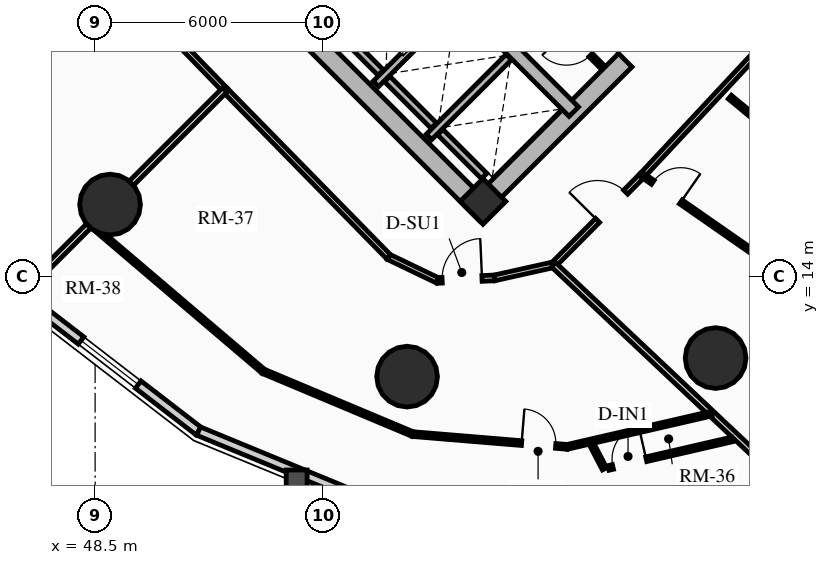
"""IFC4 building model, lengths in metres.
Left out: names, types, materials, properties, quantities, classifications, styles, units other than length and angle.
Written with IfcOpenShell. Run it as: python <this file> out.ifc"""

import sys

from ifc_helpers import new_model, si_unit, direction, frame, frame_2d, origin, origin_2d, place, context, subcontext, project, spatial, rectangle, circle, extrude, source, transform, mapped, element, fill, save


model = new_model("IFC4")
c1 = context("Model", 3, precision=1e-05, world=origin(), true_north=direction((0.0, 1.0)))
c2 = subcontext(c1, "Body", "Model", "MODEL_VIEW")
j1 = project(units=[si_unit("LENGTHUNIT", "METRE"), si_unit("PLANEANGLEUNIT", "RADIAN")], contexts=[c1])
p1 = place(None, origin())
s1 = spatial("IfcSite", under=j1, at=p1, CompositionType="ELEMENT")
p2 = place(p1, origin())
s2 = spatial("IfcBuilding", under=s1, at=p2, CompositionType="ELEMENT")
p3 = place(p2, frame((0.0, 0.0, 42.37)))
s3 = spatial("IfcBuildingStorey", under=s2, at=p3, CompositionType="ELEMENT", Elevation=42.37)
p4 = place(p3, frame((58.773, 15.661, 0.0), z_axis=(0.0, 0.0, 1.0), x_axis=(-0.707106781187, 0.707106781187, 0.0)))
e1 = element("IfcWall", 1, at=p4, inside=s3, PredefinedType="SHEAR", context=c2, shape_type="SweptSolid", body=[
    extrude(rectangle(XDim=14.3, YDim=0.5, at=frame_2d((7.15, 0.0))), origin(), (0.0, 0.0, 1.0), 2.91),
])
p5 = place(p3, frame((58.596, 15.838, 0.0), z_axis=(0.0, 0.0, 1.0), x_axis=(0.707106781187, 0.707106781187, 0.0)))
e2 = element("IfcWall", 2, at=p5, inside=s3, PredefinedType="SHEAR", context=c2, shape_type="SweptSolid", body=[
    extrude(rectangle(XDim=10.7, YDim=0.5, at=frame_2d((5.35, 0.0))), origin(), (0.0, 0.0, 1.0), 2.91),
])
m1 = source(origin(), c2, "Body", "SweptSolid", [
    extrude(rectangle(XDim=1.5, YDim=2.02, at=frame_2d((0.75, 1.01))), frame((0.0, 0.26, 0.0), z_axis=(0.0, -1.0, 0.0), x_axis=(1.0, 0.0, 0.0)), (0.0, 0.0, 1.0), 0.52),
])
p6 = place(p5, frame((5.45, 0.0, 0.0)))
e3 = element("IfcOpeningElement", 3, at=p6, cuts=e2, PredefinedType="OPENING", context=c2, shape_type="MappedRepresentation", body=[
    mapped(m1, transform((0.0, 0.0, 0.0), x_axis=(1.0, 0.0, 0.0), y_axis=(0.0, 1.0, 0.0), z_axis=(0.0, 0.0, 1.0), scale=1.0)),
])
p7 = place(p3, frame((61.096, 18.338, 0.0), z_axis=(0.0, 0.0, 1.0), x_axis=(-0.707106781187, 0.707106781187, 0.0)))
e4 = element("IfcWall", 4, at=p7, inside=s3, PredefinedType="SHEAR", context=c2, shape_type="SweptSolid", body=[
    extrude(rectangle(XDim=13.8, YDim=0.35, at=frame_2d((6.9, 0.0))), origin(), (0.0, 0.0, 1.0), 2.91),
])
m2 = source(origin(), c2, "Body", "SweptSolid", [
    extrude(rectangle(XDim=1.1, YDim=2.015, at=frame_2d((0.55, 1.007))), frame((0.0, 0.185, 0.0), z_axis=(0.0, -1.0, 0.0), x_axis=(1.0, 0.0, 0.0)), (0.0, 0.0, 1.0), 0.37),
])
p8 = place(p7, frame((4.9, 0.0, 0.0)))
e5 = element("IfcOpeningElement", 5, at=p8, cuts=e4, PredefinedType="OPENING", context=c2, shape_type="MappedRepresentation", body=[
    mapped(m2, transform((0.0, 0.0, 0.0), x_axis=(1.0, 0.0, 0.0), y_axis=(0.0, 1.0, 0.0), z_axis=(0.0, 0.0, 1.0), scale=1.0)),
])
m3 = source(origin(), c2, "Body", "SweptSolid", [
    extrude(rectangle(XDim=1.15, YDim=2.02, at=frame_2d((0.575, 1.01))), frame((0.0, 0.185, 0.0), z_axis=(0.0, -1.0, 0.0), x_axis=(1.0, 0.0, 0.0)), (0.0, 0.0, 1.0), 0.37),
])
p9 = place(p7, frame((7.32, 0.0, 0.0)))
e6 = element("IfcOpeningElement", 6, at=p9, cuts=e4, PredefinedType="OPENING", context=c2, shape_type="MappedRepresentation", body=[
    mapped(m3, transform((0.0, 0.0, 0.0), x_axis=(1.0, 0.0, 0.0), y_axis=(0.0, 1.0, 0.0), z_axis=(0.0, 0.0, 1.0), scale=1.0)),
])
p10 = place(p3, frame((58.706, 15.976, 0.0), z_axis=(0.0, 0.0, 1.0), x_axis=(0.707106781187, 0.707106781187, 0.0)))
e7 = element("IfcColumn", 7, at=p10, inside=s3, PredefinedType="COLUMN", context=c2, shape_type="SweptSolid", body=[
    extrude(rectangle(XDim=0.85, YDim=0.85, at=origin_2d()), origin(), (0.0, 0.0, 1.0), 2.91),
])
for number, where, z_axis, x_axis in (
    (8, (48.893, 15.893, 0.0), (0.0, 0.0, 1.0), (1.0, 0.0, 0.0)),
    (9, (56.709, 11.365, 0.0), (0.0, 0.0, 1.0), (1.0, 0.0, 0.0)),
    (10, (64.827, 11.854, 0.0), (0.0, 0.0, 1.0), (1.0, 0.0, 0.0)),
):
    element("IfcColumn", number, at=place(p3, frame(where, z_axis=z_axis, x_axis=x_axis)), inside=s3, PredefinedType="USERDEFINED", context=c2, shape_type="SweptSolid", body=[
        extrude(circle(Radius=0.8, at=origin_2d()), origin(), (0.0, 0.0, 1.0), 2.91),
    ])
p11 = place(p3, frame((51.222, 9.932, 0.0), z_axis=(0.0, 0.0, 1.0), x_axis=(-0.792020182601, 0.610494906082, 0.0)))
e11 = element("IfcWall", 11, at=p11, inside=s3, PredefinedType="SOLIDWALL", context=c2, shape_type="SweptSolid", body=[
    extrude(rectangle(XDim=5.911, YDim=0.24, at=frame_2d((2.956, 0.0))), origin(), (0.0, 0.0, 1.0), 2.073),
])
m4 = source(origin(), c2, "Body", "SweptSolid", [
    extrude(rectangle(XDim=1.9, YDim=1.35, at=frame_2d((0.95, 0.675))), frame((0.0, 0.13, 0.0), z_axis=(0.0, -1.0, 0.0), x_axis=(1.0, 0.0, 0.0)), (0.0, 0.0, 1.0), 0.26),
])
p12 = place(p11, frame((2.005, 0.0, 0.65)))
e12 = element("IfcOpeningElement", 12, at=p12, cuts=e11, PredefinedType="OPENING", context=c2, shape_type="MappedRepresentation", body=[
    mapped(m4, transform((0.0, 0.0, 0.0), x_axis=(1.0, 0.0, 0.0), y_axis=(0.0, 1.0, 0.0), z_axis=(0.0, 0.0, 1.0), scale=1.0)),
])
p13 = place(p3, frame((56.518, 7.749, 0.0), z_axis=(0.0, 0.0, 1.0), x_axis=(-0.924542988536, 0.381077764176, 0.0)))
e13 = element("IfcWall", 13, at=p13, inside=s3, PredefinedType="SOLIDWALL", context=c2, shape_type="SweptSolid", body=[
    extrude(rectangle(XDim=5.728, YDim=0.24, at=frame_2d((2.864, 0.0))), origin(), (0.0, 0.0, 1.0), 2.073),
])
p14 = place(p3, frame((55.888, 19.069, 0.0), z_axis=(0.0, 0.0, 1.0), x_axis=(0.707106781187, 0.707106781187, 0.0)))
e14 = element("IfcWall", 14, at=p14, inside=s3, PredefinedType="SHEAR", context=c2, shape_type="SweptSolid", body=[
    extrude(rectangle(XDim=2.97, YDim=0.2, at=frame_2d((1.485, 0.0))), origin(), (0.0, 0.0, 1.0), 2.91),
])
p15 = place(p3, frame((56.015, 19.366, 0.0), z_axis=(0.0, 0.0, 1.0), x_axis=(-0.707106781187, 0.707106781187, 0.0)))
e15 = element("IfcWall", 15, at=p15, inside=s3, PredefinedType="SHEAR", context=c2, shape_type="SweptSolid", body=[
    extrude(rectangle(XDim=2.44, YDim=0.2, at=frame_2d((1.22, 0.0))), origin(), (0.0, 0.0, 1.0), 2.91),
])
p16 = place(p3, frame((57.284, 17.673, 0.0), z_axis=(0.0, 0.0, 1.0), x_axis=(0.707147878904, 0.70706568108, 0.0)))
e16 = element("IfcWall", 16, at=p16, inside=s3, PredefinedType="SHEAR", context=c2, shape_type="SweptSolid", body=[
    extrude(rectangle(XDim=2.97, YDim=0.2, at=frame_2d((1.485, 0.0))), origin(), (0.0, 0.0, 1.0), 2.91),
])
p17 = place(p3, frame((57.412, 17.97, 0.0), z_axis=(0.0, 0.0, 1.0), x_axis=(-0.707106781187, 0.707106781187, 0.0)))
e17 = element("IfcWall", 17, at=p17, inside=s3, PredefinedType="SHEAR", context=c2, shape_type="SweptSolid", body=[
    extrude(rectangle(XDim=1.735, YDim=0.2, at=frame_2d((0.867, 0.0))), origin(), (0.0, 0.0, 1.0), 2.91),
])
p18 = place(p3, frame((58.737, 16.644, 0.0), z_axis=(0.0, 0.0, 1.0), x_axis=(-0.707032117043, 0.707181437447, 0.0)))
e18 = element("IfcWall", 18, at=p18, inside=s3, PredefinedType="SHEAR", context=c2, shape_type="SweptSolid", body=[
    extrude(rectangle(XDim=1.635, YDim=0.2, at=frame_2d((0.817, 0.0))), origin(), (0.0, 0.0, 1.0), 2.91),
])
p19 = place(p3, frame((61.835, 19.529, 0.0), z_axis=(0.0, 0.0, 1.0), x_axis=(-0.707174592913, 0.707038962956, 0.0)))
e19 = element("IfcWall", 19, at=p19, inside=s3, PredefinedType="PARTITIONING", context=c2, shape_type="SweptSolid", body=[
    extrude(rectangle(XDim=1.8, YDim=0.125, at=frame_2d((0.9, 0.0))), origin(), (0.0, 0.0, 1.0), 2.635),
])
m5 = source(origin(), c2, "Body", "SweptSolid", [
    extrude(rectangle(XDim=0.9, YDim=2.005, at=frame_2d((0.45, 1.002))), frame((0.0, 0.073, 0.0), z_axis=(0.0, -1.0, 0.0), x_axis=(1.0, 0.0, 0.0)), (0.0, 0.0, 1.0), 0.145),
])
p20 = place(p19, frame((0.42, 0.0, 0.0)))
e20 = element("IfcOpeningElement", 20, at=p20, cuts=e19, PredefinedType="OPENING", context=c2, shape_type="MappedRepresentation", body=[
    mapped(m5, transform((0.0, 0.0, 0.0), x_axis=(1.0, 0.0, 0.0), y_axis=(0.0, 1.0, 0.0), z_axis=(0.0, 0.0, 1.0), scale=1.0)),
])
p21 = place(p3, frame((47.706, 23.253, 0.0), z_axis=(0.0, 0.0, 1.0), x_axis=(0.696179266346, -0.717867974707, 0.0)))
e21 = element("IfcWall", 21, at=p21, inside=s3, PredefinedType="PARTITIONING", context=c2, shape_type="SweptSolid", body=[
    extrude(rectangle(XDim=6.045, YDim=0.15, at=frame_2d((3.022, 0.0))), origin(), (0.0, 0.0, 1.0), 2.635),
])
m6 = source(origin(), c2, "Body", "SweptSolid", [
    extrude(rectangle(XDim=1.05, YDim=2.015, at=frame_2d((0.525, 1.007))), frame((0.0, 0.085, 0.0), z_axis=(0.0, -1.0, 0.0), x_axis=(1.0, 0.0, 0.0)), (0.0, 0.0, 1.0), 0.17),
])
p22 = place(p21, frame((2.497, 0.0, 0.0)))
e22 = element("IfcOpeningElement", 22, at=p22, cuts=e21, PredefinedType="OPENING", context=c2, shape_type="MappedRepresentation", body=[
    mapped(m6, transform((0.0, 0.0, 0.0), x_axis=(1.0, 0.0, 0.0), y_axis=(0.0, 1.0, 0.0), z_axis=(0.0, 0.0, 1.0), scale=1.0)),
])
p23 = place(p3, frame((51.914, 18.914, 0.0), z_axis=(0.0, 0.0, 1.0), x_axis=(0.699999313799, -0.714143515465, 0.0)))
e23 = element("IfcWall", 23, at=p23, inside=s3, PredefinedType="PARTITIONING", context=c2, shape_type="SweptSolid", body=[
    extrude(rectangle(XDim=6.162, YDim=0.15, at=frame_2d((3.081, 0.0))), origin(), (0.0, 0.0, 1.0), 2.159),
])
p24 = place(p3, frame((56.227, 14.513, 0.0), z_axis=(0.0, 0.0, 1.0), x_axis=(0.901477579283, -0.432825801044, 0.0)))
e24 = element("IfcWall", 24, at=p24, inside=s3, PredefinedType="PARTITIONING", context=c2, shape_type="SweptSolid", body=[
    extrude(rectangle(XDim=1.424, YDim=0.15, at=frame_2d((0.712, 0.0))), origin(), (0.0, 0.0, 1.0), 2.205),
])
p25 = place(p3, frame((57.511, 13.897, 0.0), z_axis=(0.0, 0.0, 1.0), x_axis=(0.999024538494, 0.044158481476, 0.0)))
e25 = element("IfcWall", 25, at=p25, inside=s3, PredefinedType="PARTITIONING", context=c2, shape_type="SweptSolid", body=[
    extrude(rectangle(XDim=1.498, YDim=0.15, at=frame_2d((0.749, 0.0))), origin(), (0.0, 0.0, 1.0), 2.159),
])
p26 = place(p25, frame((0.12, 0.0, 0.0)))
e26 = element("IfcOpeningElement", 26, at=p26, cuts=e25, PredefinedType="OPENING", context=c2, shape_type="MappedRepresentation", body=[
    mapped(m6, transform((0.0, 0.0, 0.0), x_axis=(1.0, 0.0, 0.0), y_axis=(0.0, 1.0, 0.0), z_axis=(0.0, 0.0, 1.0), scale=1.0)),
])
p27 = place(p3, frame((59.008, 13.963, 0.0), z_axis=(0.0, 0.0, 1.0), x_axis=(0.976020856791, 0.21767702476, 0.0)))
e27 = element("IfcWall", 27, at=p27, inside=s3, PredefinedType="PARTITIONING", context=c2, shape_type="SweptSolid", body=[
    extrude(rectangle(XDim=1.593, YDim=0.15, at=frame_2d((0.796, 0.0))), origin(), (0.0, 0.0, 1.0), 2.205),
])
p28 = place(p3, frame((60.562, 14.31, 0.0), z_axis=(0.0, 0.0, 1.0), x_axis=(0.704566236161, 0.709638230975, 0.0)))
e28 = element("IfcWall", 28, at=p28, inside=s3, PredefinedType="PARTITIONING", context=c2, shape_type="SweptSolid", body=[
    extrude(rectangle(XDim=3.321, YDim=0.15, at=frame_2d((1.661, 0.0))), origin(), (0.0, 0.0, 1.0), 2.159),
])
p29 = place(p28, frame((1.643, 0.0, 0.0)))
e29 = element("IfcOpeningElement", 29, at=p29, cuts=e28, PredefinedType="OPENING", context=c2, shape_type="MappedRepresentation", body=[
    mapped(m6, transform((0.0, 0.0, 0.0), x_axis=(1.0, 0.0, 0.0), y_axis=(0.0, 1.0, 0.0), z_axis=(0.0, 0.0, 1.0), scale=1.0)),
])
p30 = place(p3, frame((62.903, 16.667, 0.0), z_axis=(0.0, 0.0, 1.0), x_axis=(0.682371947497, 0.731005147225, 0.0)))
e30 = element("IfcWall", 30, at=p30, inside=s3, PredefinedType="PARTITIONING", context=c2, shape_type="SweptSolid", body=[
    extrude(rectangle(XDim=6.642, YDim=0.15, at=frame_2d((3.321, 0.0))), origin(), (0.0, 0.0, 1.0), 2.159),
])
p31 = place(p3, frame((51.914, 18.914, 0.0), z_axis=(0.0, 0.0, 1.0), x_axis=(-0.707106781187, -0.707106781187, 0.0)))
e31 = element("IfcWall", 31, at=p31, inside=s3, PredefinedType="PARTITIONING", context=c2, shape_type="SweptSolid", body=[
    extrude(rectangle(XDim=7.579, YDim=0.16, at=frame_2d((3.79, 0.0))), origin(), (0.0, 0.0, 1.0), 2.073),
])
p32 = place(p3, frame((60.562, 14.31, 0.0), z_axis=(0.0, 0.0, 1.0), x_axis=(0.727781661561, -0.685808904211, 0.0)))
e32 = element("IfcWall", 32, at=p32, inside=s3, PredefinedType="PARTITIONING", context=c2, shape_type="SweptSolid", body=[
    extrude(rectangle(XDim=8.655, YDim=0.16, at=frame_2d((4.328, 0.0))), origin(), (0.0, 0.0, 1.0), 2.073),
])
p33 = place(p3, frame((48.377, 15.377, 0.0), z_axis=(0.0, 0.0, 1.0), x_axis=(0.761505943152, -0.648157927163, 0.0)))
e33 = element("IfcWall", 33, at=p33, inside=s3, PredefinedType="PARTITIONING", context=c2, shape_type="SweptSolid", body=[
    extrude(rectangle(XDim=5.979, YDim=0.125, at=frame_2d((2.99, 0.0))), origin(), (0.0, 0.0, 1.0), 2.635),
])
p34 = place(p3, frame((52.93, 11.501, 0.0), z_axis=(0.0, 0.0, 1.0), x_axis=(0.922051248037, -0.387067818338, 0.0)))
e34 = element("IfcWall", 34, at=p34, inside=s3, PredefinedType="PARTITIONING", context=c2, shape_type="SweptSolid", body=[
    extrude(rectangle(XDim=4.26, YDim=0.125, at=frame_2d((2.13, 0.0))), origin(), (0.0, 0.0, 1.0), 2.159),
])
p35 = place(p3, frame((56.858, 9.852, 0.0), z_axis=(0.0, 0.0, 1.0), x_axis=(0.996604967548, -0.082331881181, 0.0)))
e35 = element("IfcWall", 35, at=p35, inside=s3, PredefinedType="PARTITIONING", context=c2, shape_type="SweptSolid", body=[
    extrude(rectangle(XDim=4.077, YDim=0.125, at=frame_2d((2.039, 0.0))), origin(), (0.0, 0.0, 1.0), 2.635),
])
p36 = place(p35, frame((2.874, 0.0, 0.0)))
e36 = element("IfcOpeningElement", 36, at=p36, cuts=e35, PredefinedType="OPENING", context=c2, shape_type="MappedRepresentation", body=[
    mapped(m5, transform((0.0, 0.0, 0.0), x_axis=(1.0, 0.0, 0.0), y_axis=(0.0, 1.0, 0.0), z_axis=(0.0, 0.0, 1.0), scale=1.0)),
])
p37 = place(p3, frame((60.921, 9.517, 0.0), z_axis=(0.0, 0.0, 1.0), x_axis=(0.974453436038, 0.224589627973, 0.0)))
e37 = element("IfcWall", 37, at=p37, inside=s3, PredefinedType="PARTITIONING", context=c2, shape_type="SweptSolid", body=[
    extrude(rectangle(XDim=3.898, YDim=0.125, at=frame_2d((1.949, 0.0))), origin(), (0.0, 0.0, 1.0), 2.205),
])
p38 = place(p3, frame((61.564, 9.589, 0.0), z_axis=(0.0, 0.0, 1.0), x_axis=(0.462168536246, -0.886792108729, 0.0)))
e38 = element("IfcWall", 38, at=p38, inside=s3, PredefinedType="PARTITIONING", context=c2, shape_type="SweptSolid", body=[
    extrude(rectangle(XDim=0.735, YDim=0.125, at=frame_2d((0.367, 0.0))), origin(), (0.0, 0.0, 1.0), 2.635),
])
p39 = place(p3, frame((62.008, 8.962, 0.0), z_axis=(0.0, 0.0, 1.0), x_axis=(0.974365294983, 0.224971713626, 0.0)))
e39 = element("IfcWall", 39, at=p39, inside=s3, PredefinedType="PARTITIONING", context=c2, shape_type="SweptSolid", body=[
    extrude(rectangle(XDim=3.337, YDim=0.125, at=frame_2d((1.668, 0.0))), origin(), (0.0, 0.0, 1.0), 2.635),
])
p40 = place(p39, frame((0.12, 0.0, 0.0)))
e40 = element("IfcOpeningElement", 40, at=p40, cuts=e39, PredefinedType="OPENING", context=c2, shape_type="MappedRepresentation", body=[
    mapped(m5, transform((0.0, 0.0, 0.0), x_axis=(1.0, 0.0, 0.0), y_axis=(0.0, 1.0, 0.0), z_axis=(0.0, 0.0, 1.0), scale=1.0)),
])
p41 = place(p3, frame((62.903, 16.667, 0.0), z_axis=(0.0, 0.0, 1.0), x_axis=(0.820761665638, -0.571270766116, 0.0)))
e41 = element("IfcWall", 41, at=p41, inside=s3, PredefinedType="PARTITIONING", context=c2, shape_type="SweptSolid", body=[
    extrude(rectangle(XDim=9.743, YDim=0.125, at=frame_2d((4.872, 0.0))), origin(), (0.0, 0.0, 1.0), 2.073),
])
p42 = place(p41, frame((0.33, 0.0, 0.0)))
e42 = element("IfcOpeningElement", 42, at=p42, cuts=e41, PredefinedType="OPENING", context=c2, shape_type="MappedRepresentation", body=[
    mapped(m5, transform((0.0, 0.0, 0.0), x_axis=(1.0, 0.0, 0.0), y_axis=(0.0, 1.0, 0.0), z_axis=(0.0, 0.0, 1.0), scale=1.0)),
])
p43 = place(p3, frame((65.202, 18.721, 0.0), z_axis=(0.0, 0.0, 1.0), x_axis=(0.769814202386, -0.638268042287, 0.0)))
e43 = element("IfcWall", 43, at=p43, inside=s3, PredefinedType="PARTITIONING", context=c2, shape_type="SweptSolid", body=[
    extrude(rectangle(XDim=1.769, YDim=0.125, at=frame_2d((0.884, 0.0))), origin(), (0.0, 0.0, 1.0), 2.635),
])
m7 = source(origin(), c2, "Body", "SweptSolid", [
    extrude(rectangle(XDim=1.9, YDim=1.35, at=frame_2d((0.95, 0.675))), frame((0.0, 0.03, 0.0), z_axis=(0.0, -1.0, 0.0), x_axis=(1.0, 0.0, 0.0)), (0.0, 0.0, 1.0), 0.06),
])
p44 = place(p12, origin())
e44 = element("IfcWindow", 44, at=p44, inside=s3, PartitioningType="DOUBLE_PANEL_VERTICAL", PredefinedType="WINDOW", context=c2, shape_type="MappedRepresentation", body=[
    mapped(m7, transform((0.0, 0.0, 0.0), x_axis=(1.0, 0.0, 0.0), y_axis=(0.0, 1.0, 0.0), z_axis=(0.0, 0.0, 1.0), scale=1.0)),
])
fill(e12, e44)
m8 = source(origin(), c2, "Body", "SweptSolid", [
    extrude(rectangle(XDim=1.5, YDim=2.02, at=frame_2d((0.75, 1.01))), frame((0.0, 0.025, 0.0), z_axis=(0.0, -1.0, 0.0), x_axis=(1.0, 0.0, 0.0)), (0.0, 0.0, 1.0), 0.05),
])
p45 = place(p6, origin())
e45 = element("IfcDoor", 45, at=p45, inside=s3, OperationType="DOUBLE_DOOR_SINGLE_SWING", PredefinedType="DOOR", context=c2, shape_type="MappedRepresentation", body=[
    mapped(m8, transform((0.0, 0.0, 0.0), x_axis=(1.0, 0.0, 0.0), y_axis=(0.0, 1.0, 0.0), z_axis=(0.0, 0.0, 1.0), scale=1.0)),
])
fill(e3, e45)
m9 = source(origin(), c2, "Body", "SweptSolid", [
    extrude(rectangle(XDim=0.9, YDim=2.005, at=frame_2d((0.45, 1.002))), frame((0.0, 0.025, 0.0), z_axis=(0.0, -1.0, 0.0), x_axis=(1.0, 0.0, 0.0)), (0.0, 0.0, 1.0), 0.05),
])
p46 = place(p20, origin())
e46 = element("IfcDoor", 46, at=p46, inside=s3, OperationType="SINGLE_SWING_RIGHT", PredefinedType="DOOR", context=c2, shape_type="MappedRepresentation", body=[
    mapped(m9, transform((0.0, 0.0, 0.0), x_axis=(1.0, 0.0, 0.0), y_axis=(0.0, 1.0, 0.0), z_axis=(0.0, 0.0, 1.0), scale=1.0)),
])
fill(e20, e46)
m10 = source(origin(), c2, "Body", "SweptSolid", [
    extrude(rectangle(XDim=1.05, YDim=2.015, at=frame_2d((0.525, 1.007))), frame((0.0, 0.025, 0.0), z_axis=(0.0, -1.0, 0.0), x_axis=(1.0, 0.0, 0.0)), (0.0, 0.0, 1.0), 0.05),
])
p47 = place(p26, origin())
e47 = element("IfcDoor", 47, at=p47, inside=s3, OperationType="SINGLE_SWING_RIGHT", PredefinedType="DOOR", context=c2, shape_type="MappedRepresentation", body=[
    mapped(m10, transform((0.0, 0.0, 0.0), x_axis=(1.0, 0.0, 0.0), y_axis=(0.0, 1.0, 0.0), z_axis=(0.0, 0.0, 1.0), scale=1.0)),
])
fill(e26, e47)
p48 = place(p36, origin())
e48 = element("IfcDoor", 48, at=p48, inside=s3, OperationType="SINGLE_SWING_LEFT", PredefinedType="DOOR", context=c2, shape_type="MappedRepresentation", body=[
    mapped(m9, transform((0.0, 0.0, 0.0), x_axis=(1.0, 0.0, 0.0), y_axis=(0.0, 1.0, 0.0), z_axis=(0.0, 0.0, 1.0), scale=1.0)),
])
fill(e36, e48)
p49 = place(p40, origin())
e49 = element("IfcDoor", 49, at=p49, inside=s3, OperationType="SINGLE_SWING_RIGHT", PredefinedType="DOOR", context=c2, shape_type="MappedRepresentation", body=[
    mapped(m9, transform((0.0, 0.0, 0.0), x_axis=(1.0, 0.0, 0.0), y_axis=(0.0, 1.0, 0.0), z_axis=(0.0, 0.0, 1.0), scale=1.0)),
])
fill(e40, e49)
p50 = place(p29, origin())
e50 = element("IfcDoor", 50, at=p50, inside=s3, OperationType="SINGLE_SWING_LEFT", PredefinedType="DOOR", context=c2, shape_type="MappedRepresentation", body=[
    mapped(m10, transform((0.0, 0.0, 0.0), x_axis=(1.0, 0.0, 0.0), y_axis=(0.0, 1.0, 0.0), z_axis=(0.0, 0.0, 1.0), scale=1.0)),
])
fill(e29, e50)
p51 = place(p42, origin())
e51 = element("IfcDoor", 51, at=p51, inside=s3, OperationType="SINGLE_SWING_RIGHT", PredefinedType="DOOR", context=c2, shape_type="MappedRepresentation", body=[
    mapped(m9, transform((0.0, 0.0, 0.0), x_axis=(1.0, 0.0, 0.0), y_axis=(0.0, 1.0, 0.0), z_axis=(0.0, 0.0, 1.0), scale=1.0)),
])
fill(e42, e51)
save(model, sys.argv[1])
